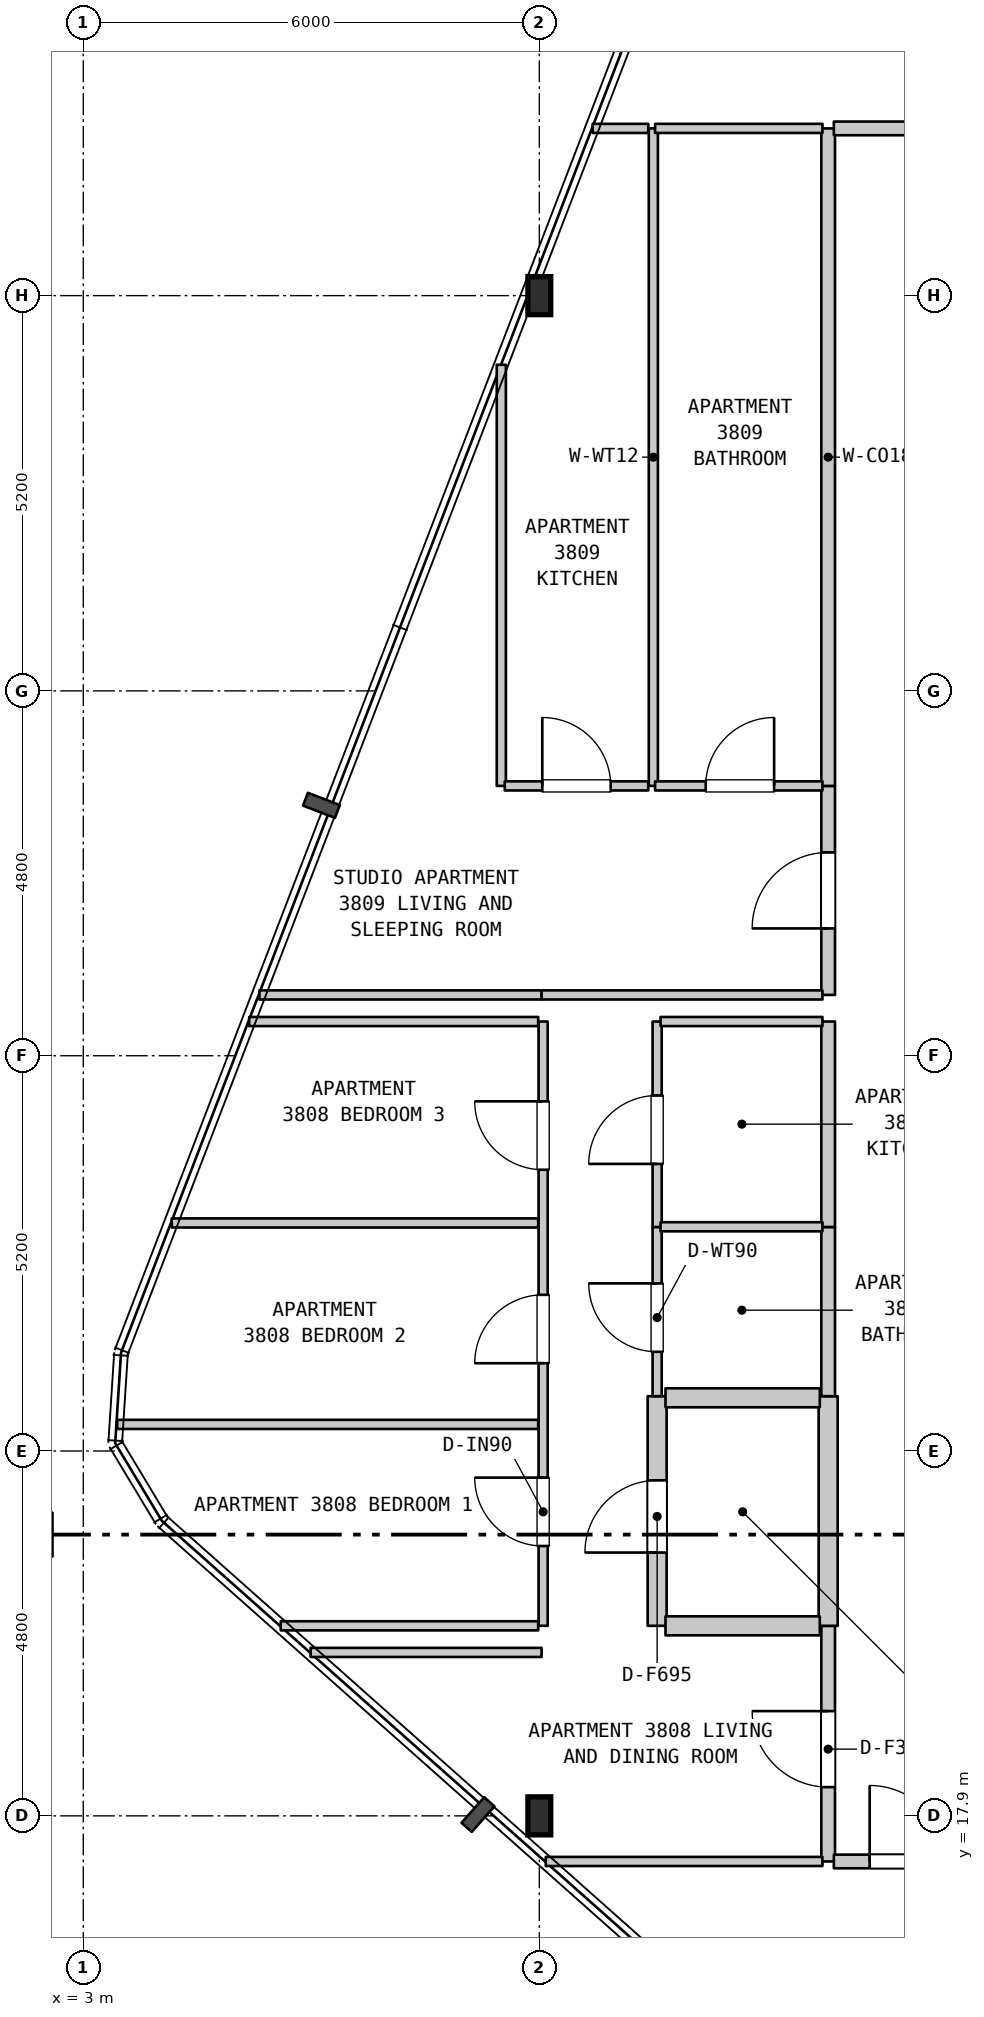
"""IFC4 building model, lengths in metres.
Left out: names, types, materials, properties, quantities, classifications, styles, units other than length and angle.
Written with IfcOpenShell. Run it as: python <this file> out.ifc"""

import sys

from ifc_helpers import new_model, si_unit, direction, frame, frame_2d, origin, origin_2d, place, context, subcontext, project, spatial, rectangle, i_section, extrude, element, fill, save


model = new_model("IFC4")
c1 = context("Model", 3, precision=1e-05, world=origin(), true_north=direction((0.0, 1.0)))
c2 = subcontext(c1, "Body", "Model", "MODEL_VIEW")
j1 = project(units=[si_unit("LENGTHUNIT", "METRE"), si_unit("PLANEANGLEUNIT", "RADIAN")], contexts=[c1])
p1 = place(None, origin())
s1 = spatial("IfcSite", under=j1, at=p1, CompositionType="ELEMENT")
p2 = place(p1, origin())
s2 = spatial("IfcBuilding", under=s1, at=p2, CompositionType="ELEMENT")
p3 = place(p2, frame((0.0, 0.0, 155.7)))
s3 = spatial("IfcBuildingStorey", under=s2, at=p3, CompositionType="ELEMENT", Elevation=155.7)
for number, where, z_axis, x_axis in (
    (1, (9.0, 17.9, 0.0), (0.0, 0.0, 1.0), (1.0, 0.0, 0.0)),
    (2, (9.0, 37.9, 0.0), (0.0, 0.0, 1.0), (1.0, 0.0, 0.0)),
):
    element("IfcColumn", number, at=place(p3, frame(where, z_axis=z_axis, x_axis=x_axis)), inside=s3, PredefinedType="COLUMN", context=c2, shape_type="SweptSolid", body=[
        extrude(i_section(OverallWidth=0.3, OverallDepth=0.5, WebThickness=0.014, FlangeThickness=0.028, FilletRadius=0.027, at=origin_2d()), origin(), (0.0, 0.0, 1.0), 3.7),
    ])
p4 = place(p3, frame((8.5, 31.45, 0.0), z_axis=(0.0, 0.0, 1.0), x_axis=(0.0, 1.0, 0.0)))
e3 = element("IfcWall", 3, at=p4, inside=s3, PredefinedType="PARTITIONING", context=c2, shape_type="SweptSolid", body=[
    extrude(rectangle(XDim=5.54, YDim=0.12, at=frame_2d((2.77, 0.0))), origin(), (0.0, 0.0, 1.0), 3.28),
])
p5 = place(p3, frame((9.05, 20.4, 0.0), z_axis=(0.0, 0.0, 1.0), x_axis=(0.0, 1.0, 0.0)))
e4 = element("IfcWall", 4, at=p5, inside=s3, PredefinedType="PARTITIONING", context=c2, shape_type="SweptSolid", body=[
    extrude(rectangle(XDim=7.95, YDim=0.12, at=frame_2d((3.975, 0.0))), origin(), (0.0, 0.0, 1.0), 2.68),
])
p6 = place(p5, frame((1.05, 0.0, 0.0)))
e5 = element("IfcOpeningElement", 5, at=p6, cuts=e4, PredefinedType="OPENING", context=c2, shape_type="SweptSolid", body=[
    extrude(rectangle(XDim=0.9, YDim=2.15, at=frame_2d((0.45, 1.075))), frame((0.0, 0.07, 0.0), z_axis=(0.0, -1.0, 0.0), x_axis=(1.0, 0.0, 0.0)), (0.0, 0.0, 1.0), 0.14),
])
p7 = place(p5, frame((3.455, 0.0, 0.0)))
e6 = element("IfcOpeningElement", 6, at=p7, cuts=e4, PredefinedType="OPENING", context=c2, shape_type="SweptSolid", body=[
    extrude(rectangle(XDim=0.9, YDim=2.15, at=frame_2d((0.45, 1.075))), frame((0.0, 0.07, 0.0), z_axis=(0.0, -1.0, 0.0), x_axis=(1.0, 0.0, 0.0)), (0.0, 0.0, 1.0), 0.14),
])
p8 = place(p5, frame((6.0, 0.0, 0.0)))
e7 = element("IfcOpeningElement", 7, at=p8, cuts=e4, PredefinedType="OPENING", context=c2, shape_type="SweptSolid", body=[
    extrude(rectangle(XDim=0.9, YDim=2.15, at=frame_2d((0.45, 1.075))), frame((0.0, 0.07, 0.0), z_axis=(0.0, -1.0, 0.0), x_axis=(1.0, 0.0, 0.0)), (0.0, 0.0, 1.0), 0.14),
])
p9 = place(p3, frame((10.5, 31.45, 0.0), z_axis=(0.0, 0.0, 1.0), x_axis=(0.0, 1.0, 0.0)))
e8 = element("IfcWall", 8, at=p9, inside=s3, PredefinedType="PARTITIONING", context=c2, shape_type="SweptSolid", body=[
    extrude(rectangle(XDim=8.65, YDim=0.12, at=frame_2d((4.325, 0.0))), origin(), (0.0, 0.0, 1.0), 3.28),
])
p10 = place(p3, frame((10.55, 20.4, 0.0), z_axis=(0.0, 0.0, 1.0), x_axis=(0.0, 1.0, 0.0)))
e9 = element("IfcWall", 9, at=p10, inside=s3, PredefinedType="STANDARD", context=c2, shape_type="SweptSolid", body=[
    extrude(rectangle(XDim=3.021, YDim=0.25, at=frame_2d((1.51, 0.0))), origin(), (0.0, 0.0, 1.0), 3.28),
])
p11 = place(p10, frame((0.964, 0.0, 0.0)))
e10 = element("IfcOpeningElement", 10, at=p11, cuts=e9, PredefinedType="OPENING", context=c2, shape_type="SweptSolid", body=[
    extrude(rectangle(XDim=0.95, YDim=2.15, at=frame_2d((0.475, 1.075))), frame((0.0, 0.135, 0.0), z_axis=(0.0, -1.0, 0.0), x_axis=(1.0, 0.0, 0.0)), (0.0, 0.0, 1.0), 0.27),
])
p12 = place(p3, frame((10.55, 23.421, 0.0), z_axis=(0.0, 0.0, 1.0), x_axis=(0.0, 1.0, 0.0)))
e11 = element("IfcWall", 11, at=p12, inside=s3, PredefinedType="PARTITIONING", context=c2, shape_type="SweptSolid", body=[
    extrude(rectangle(XDim=2.226, YDim=0.12, at=frame_2d((1.113, 0.0))), origin(), (0.0, 0.0, 1.0), 3.28),
])
p13 = place(p12, frame((0.584, 0.0, 0.0)))
e12 = element("IfcOpeningElement", 12, at=p13, cuts=e11, PredefinedType="OPENING", context=c2, shape_type="SweptSolid", body=[
    extrude(rectangle(XDim=0.9, YDim=2.1, at=frame_2d((0.45, 1.05))), frame((0.0, 0.07, 0.0), z_axis=(0.0, -1.0, 0.0), x_axis=(1.0, 0.0, 0.0)), (0.0, 0.0, 1.0), 0.14),
])
p14 = place(p3, frame((10.55, 25.647, 0.0), z_axis=(0.0, 0.0, 1.0), x_axis=(0.0, 1.0, 0.0)))
e13 = element("IfcWall", 13, at=p14, inside=s3, PredefinedType="PARTITIONING", context=c2, shape_type="SweptSolid", body=[
    extrude(rectangle(XDim=2.703, YDim=0.12, at=frame_2d((1.352, 0.0))), origin(), (0.0, 0.0, 1.0), 3.28),
])
p15 = place(p14, frame((0.83, 0.0, 0.0)))
e14 = element("IfcOpeningElement", 14, at=p15, cuts=e13, PredefinedType="OPENING", context=c2, shape_type="SweptSolid", body=[
    extrude(rectangle(XDim=0.9, YDim=2.15, at=frame_2d((0.45, 1.075))), frame((0.0, 0.07, 0.0), z_axis=(0.0, -1.0, 0.0), x_axis=(1.0, 0.0, 0.0)), (0.0, 0.0, 1.0), 0.14),
])
p16 = place(p3, frame((12.8, 17.3, 0.0), z_axis=(0.0, 0.0, 1.0), x_axis=(0.0, 1.0, 0.0)))
e15 = element("IfcWall", 15, at=p16, inside=s3, PredefinedType="STANDARD", context=c2, shape_type="SweptSolid", body=[
    extrude(rectangle(XDim=3.1, YDim=0.18, at=frame_2d((1.55, 0.0))), origin(), (0.0, 0.0, 1.0), 3.28),
])
p17 = place(p16, frame((0.978, 0.0, 0.0)))
e16 = element("IfcOpeningElement", 16, at=p17, cuts=e15, PredefinedType="OPENING", context=c2, shape_type="SweptSolid", body=[
    extrude(rectangle(XDim=1.0, YDim=2.15, at=frame_2d((0.5, 1.075))), frame((0.0, 0.1, 0.0), z_axis=(0.0, -1.0, 0.0), x_axis=(1.0, 0.0, 0.0)), (0.0, 0.0, 1.0), 0.2),
])
p18 = place(p3, frame((12.8, 20.4, 0.0), z_axis=(0.0, 0.0, 1.0), x_axis=(0.0, 1.0, 0.0)))
e17 = element("IfcWall", 17, at=p18, inside=s3, PredefinedType="STANDARD", context=c2, shape_type="SweptSolid", body=[
    extrude(rectangle(XDim=3.021, YDim=0.25, at=frame_2d((1.51, 0.0))), origin(), (0.0, 0.0, 1.0), 3.28),
])
p19 = place(p3, frame((12.8, 23.421, 0.0), z_axis=(0.0, 0.0, 1.0), x_axis=(0.0, 1.0, 0.0)))
e18 = element("IfcWall", 18, at=p19, inside=s3, PredefinedType="STANDARD", context=c2, shape_type="SweptSolid", body=[
    extrude(rectangle(XDim=2.226, YDim=0.18, at=frame_2d((1.113, 0.0))), origin(), (0.0, 0.0, 1.0), 3.28),
])
p20 = place(p3, frame((12.8, 25.647, 0.0), z_axis=(0.0, 0.0, 1.0), x_axis=(0.0, 1.0, 0.0)))
e19 = element("IfcWall", 19, at=p20, inside=s3, PredefinedType="STANDARD", context=c2, shape_type="SweptSolid", body=[
    extrude(rectangle(XDim=2.703, YDim=0.18, at=frame_2d((1.352, 0.0))), origin(), (0.0, 0.0, 1.0), 3.28),
])
p21 = place(p3, frame((12.8, 28.7, 0.0), z_axis=(0.0, 0.0, 1.0), x_axis=(0.0, 1.0, 0.0)))
e20 = element("IfcWall", 20, at=p21, inside=s3, PredefinedType="STANDARD", context=c2, shape_type="SweptSolid", body=[
    extrude(rectangle(XDim=2.75, YDim=0.18, at=frame_2d((1.375, 0.0))), origin(), (0.0, 0.0, 1.0), 3.28),
])
p22 = place(p21, frame((0.875, 0.0, 0.0)))
e21 = element("IfcOpeningElement", 21, at=p22, cuts=e20, PredefinedType="OPENING", context=c2, shape_type="SweptSolid", body=[
    extrude(rectangle(XDim=1.0, YDim=2.15, at=frame_2d((0.5, 1.075))), frame((0.0, 0.1, 0.0), z_axis=(0.0, -1.0, 0.0), x_axis=(1.0, 0.0, 0.0)), (0.0, 0.0, 1.0), 0.2),
])
p23 = place(p3, frame((12.8, 31.45, 0.0), z_axis=(0.0, 0.0, 1.0), x_axis=(0.0, 1.0, 0.0)))
e22 = element("IfcWall", 22, at=p23, inside=s3, PredefinedType="STANDARD", context=c2, shape_type="SweptSolid", body=[
    extrude(rectangle(XDim=8.65, YDim=0.18, at=frame_2d((4.325, 0.0))), origin(), (0.0, 0.0, 1.0), 3.28),
])
p24 = place(p3, frame((9.085, 17.3, 0.0), z_axis=(0.0, 0.0, 1.0), x_axis=(1.0, 0.0, 0.0)))
e23 = element("IfcWall", 23, at=p24, inside=s3, PredefinedType="PARTITIONING", context=c2, shape_type="SweptSolid", body=[
    extrude(rectangle(XDim=3.64, YDim=0.12, at=frame_2d((1.82, 0.0))), origin(), (0.0, 0.0, 1.0), 3.28),
])
p25 = place(p3, frame((12.875, 17.3, 0.0), z_axis=(0.0, 0.0, 1.0), x_axis=(1.0, 0.0, 0.0)))
e24 = element("IfcWall", 24, at=p25, inside=s3, PredefinedType="STANDARD", context=c2, shape_type="SweptSolid", body=[
    extrude(rectangle(XDim=3.28, YDim=0.18, at=frame_2d((1.64, 0.0))), origin(), (0.0, 0.0, 1.0), 3.28),
])
p26 = place(p25, frame((0.471, 0.0, 0.0)))
e25 = element("IfcOpeningElement", 25, at=p26, cuts=e24, PredefinedType="OPENING", context=c2, shape_type="SweptSolid", body=[
    extrude(rectangle(XDim=1.0, YDim=2.15, at=frame_2d((0.5, 1.075))), frame((0.0, 0.1, 0.0), z_axis=(0.0, -1.0, 0.0), x_axis=(1.0, 0.0, 0.0)), (0.0, 0.0, 1.0), 0.2),
])
p27 = place(p3, frame((5.991, 20.05, 0.0), z_axis=(0.0, 0.0, 1.0), x_axis=(1.0, 0.0, 0.0)))
e26 = element("IfcWall", 26, at=p27, inside=s3, PredefinedType="PARTITIONING", context=c2, shape_type="SweptSolid", body=[
    extrude(rectangle(XDim=3.039, YDim=0.12, at=frame_2d((1.52, 0.0))), origin(), (0.0, 0.0, 1.0), 3.28),
])
p28 = place(p3, frame((5.598, 20.4, 0.0), z_axis=(0.0, 0.0, 1.0), x_axis=(1.0, 0.0, 0.0)))
e27 = element("IfcWall", 27, at=p28, inside=s3, PredefinedType="PARTITIONING", context=c2, shape_type="SweptSolid", body=[
    extrude(rectangle(XDim=3.387, YDim=0.12, at=frame_2d((1.694, 0.0))), origin(), (0.0, 0.0, 1.0), 3.28),
])
p29 = place(p3, frame((10.66, 20.4, 0.0), z_axis=(0.0, 0.0, 1.0), x_axis=(1.0, 0.0, 0.0)))
e28 = element("IfcWall", 28, at=p29, inside=s3, PredefinedType="STANDARD", context=c2, shape_type="SweptSolid", body=[
    extrude(rectangle(XDim=2.03, YDim=0.25, at=frame_2d((1.015, 0.0))), origin(), (0.0, 0.0, 1.0), 3.28),
])
p30 = place(p3, frame((3.446, 23.05, 0.0), z_axis=(0.0, 0.0, 1.0), x_axis=(1.0, 0.0, 0.0)))
e29 = element("IfcWall", 29, at=p30, inside=s3, PredefinedType="PARTITIONING", context=c2, shape_type="SweptSolid", body=[
    extrude(rectangle(XDim=5.539, YDim=0.12, at=frame_2d((2.77, 0.0))), origin(), (0.0, 0.0, 1.0), 3.28),
])
p31 = place(p3, frame((10.66, 23.4, 0.0), z_axis=(0.0, 0.0, 1.0), x_axis=(1.0, 0.0, 0.0)))
e30 = element("IfcWall", 30, at=p31, inside=s3, PredefinedType="STANDARD", context=c2, shape_type="SweptSolid", body=[
    extrude(rectangle(XDim=2.03, YDim=0.25, at=frame_2d((1.015, 0.0))), origin(), (0.0, 0.0, 1.0), 3.28),
])
p32 = place(p3, frame((10.595, 25.65, 0.0), z_axis=(0.0, 0.0, 1.0), x_axis=(1.0, 0.0, 0.0)))
e31 = element("IfcWall", 31, at=p32, inside=s3, PredefinedType="PARTITIONING", context=c2, shape_type="SweptSolid", body=[
    extrude(rectangle(XDim=2.13, YDim=0.12, at=frame_2d((1.065, 0.0))), origin(), (0.0, 0.0, 1.0), 3.28),
])
p33 = place(p3, frame((4.164, 25.7, 0.0), z_axis=(0.0, 0.0, 1.0), x_axis=(1.0, 0.0, 0.0)))
e32 = element("IfcWall", 32, at=p33, inside=s3, PredefinedType="PARTITIONING", context=c2, shape_type="SweptSolid", body=[
    extrude(rectangle(XDim=4.821, YDim=0.12, at=frame_2d((2.411, 0.0))), origin(), (0.0, 0.0, 1.0), 3.28),
])
p34 = place(p3, frame((5.183, 28.35, 0.0), z_axis=(0.0, 0.0, 1.0), x_axis=(1.0, 0.0, 0.0)))
e33 = element("IfcWall", 33, at=p34, inside=s3, PredefinedType="PARTITIONING", context=c2, shape_type="SweptSolid", body=[
    extrude(rectangle(XDim=3.802, YDim=0.12, at=frame_2d((1.901, 0.0))), origin(), (0.0, 0.0, 1.0), 3.28),
])
p35 = place(p3, frame((10.595, 28.35, 0.0), z_axis=(0.0, 0.0, 1.0), x_axis=(1.0, 0.0, 0.0)))
e34 = element("IfcWall", 34, at=p35, inside=s3, PredefinedType="PARTITIONING", context=c2, shape_type="SweptSolid", body=[
    extrude(rectangle(XDim=2.13, YDim=0.12, at=frame_2d((1.065, 0.0))), origin(), (0.0, 0.0, 1.0), 3.28),
])
p36 = place(p3, frame((5.317, 28.7, 0.0), z_axis=(0.0, 0.0, 1.0), x_axis=(1.0, 0.0, 0.0)))
e35 = element("IfcWall", 35, at=p36, inside=s3, PredefinedType="PARTITIONING", context=c2, shape_type="SweptSolid", body=[
    extrude(rectangle(XDim=3.713, YDim=0.12, at=frame_2d((1.856, 0.0))), origin(), (0.0, 0.0, 1.0), 3.28),
])
p37 = place(p3, frame((9.03, 28.7, 0.0), z_axis=(0.0, 0.0, 1.0), x_axis=(1.0, 0.0, 0.0)))
e36 = element("IfcWall", 36, at=p37, inside=s3, PredefinedType="PARTITIONING", context=c2, shape_type="SweptSolid", body=[
    extrude(rectangle(XDim=3.695, YDim=0.12, at=frame_2d((1.848, 0.0))), origin(), (0.0, 0.0, 1.0), 3.28),
])
p38 = place(p3, frame((8.545, 31.45, 0.0), z_axis=(0.0, 0.0, 1.0), x_axis=(1.0, 0.0, 0.0)))
e37 = element("IfcWall", 37, at=p38, inside=s3, PredefinedType="PARTITIONING", context=c2, shape_type="SweptSolid", body=[
    extrude(rectangle(XDim=1.888, YDim=0.12, at=frame_2d((0.944, 0.0))), origin(), (0.0, 0.0, 1.0), 3.28),
])
p39 = place(p38, frame((0.494, 0.0, 0.0)))
e38 = element("IfcOpeningElement", 38, at=p39, cuts=e37, PredefinedType="OPENING", context=c2, shape_type="SweptSolid", body=[
    extrude(rectangle(XDim=0.9, YDim=2.15, at=frame_2d((0.45, 1.075))), frame((0.0, 0.07, 0.0), z_axis=(0.0, -1.0, 0.0), x_axis=(1.0, 0.0, 0.0)), (0.0, 0.0, 1.0), 0.14),
])
p40 = place(p3, frame((10.523, 31.45, 0.0), z_axis=(0.0, 0.0, 1.0), x_axis=(1.0, 0.0, 0.0)))
e39 = element("IfcWall", 39, at=p40, inside=s3, PredefinedType="PARTITIONING", context=c2, shape_type="SweptSolid", body=[
    extrude(rectangle(XDim=2.202, YDim=0.12, at=frame_2d((1.101, 0.0))), origin(), (0.0, 0.0, 1.0), 3.28),
])
p41 = place(p40, frame((0.666, 0.0, 0.0)))
e40 = element("IfcOpeningElement", 40, at=p41, cuts=e39, PredefinedType="OPENING", context=c2, shape_type="SweptSolid", body=[
    extrude(rectangle(XDim=0.9, YDim=2.1, at=frame_2d((0.45, 1.05))), frame((0.0, 0.07, 0.0), z_axis=(0.0, -1.0, 0.0), x_axis=(1.0, 0.0, 0.0)), (0.0, 0.0, 1.0), 0.14),
])
p42 = place(p3, frame((9.702, 40.1, 0.0), z_axis=(0.0, 0.0, 1.0), x_axis=(1.0, 0.0, 0.0)))
e41 = element("IfcWall", 41, at=p42, inside=s3, PredefinedType="PARTITIONING", context=c2, shape_type="SweptSolid", body=[
    extrude(rectangle(XDim=0.731, YDim=0.12, at=frame_2d((0.366, 0.0))), origin(), (0.0, 0.0, 1.0), 3.28),
])
p43 = place(p3, frame((10.523, 40.1, 0.0), z_axis=(0.0, 0.0, 1.0), x_axis=(1.0, 0.0, 0.0)))
e42 = element("IfcWall", 42, at=p43, inside=s3, PredefinedType="PARTITIONING", context=c2, shape_type="SweptSolid", body=[
    extrude(rectangle(XDim=2.202, YDim=0.12, at=frame_2d((1.101, 0.0))), origin(), (0.0, 0.0, 1.0), 3.28),
])
p44 = place(p3, frame((12.875, 40.1, 0.0), z_axis=(0.0, 0.0, 1.0), x_axis=(1.0, 0.0, 0.0)))
e43 = element("IfcWall", 43, at=p44, inside=s3, PredefinedType="STANDARD", context=c2, shape_type="SweptSolid", body=[
    extrude(rectangle(XDim=5.8, YDim=0.18, at=frame_2d((2.9, 0.0))), origin(), (0.0, 0.0, 1.0), 3.28),
])
p45 = place(p44, frame((2.314, 0.0, 0.0)))
e44 = element("IfcOpeningElement", 44, at=p45, cuts=e43, PredefinedType="OPENING", context=c2, shape_type="SweptSolid", body=[
    extrude(rectangle(XDim=1.0, YDim=2.15, at=frame_2d((0.5, 1.075))), frame((0.0, 0.1, 0.0), z_axis=(0.0, -1.0, 0.0), x_axis=(1.0, 0.0, 0.0)), (0.0, 0.0, 1.0), 0.2),
])
p46 = place(p6, origin())
e45 = element("IfcDoor", 45, at=p46, inside=s3, OperationType="SINGLE_SWING_RIGHT", PredefinedType="DOOR", context=c2, shape_type="SweptSolid", body=[
    extrude(rectangle(XDim=0.9, YDim=2.15, at=frame_2d((0.45, 1.075))), frame((0.0, 0.025, 0.0), z_axis=(0.0, -1.0, 0.0), x_axis=(1.0, 0.0, 0.0)), (0.0, 0.0, 1.0), 0.05),
])
fill(e5, e45)
p47 = place(p7, origin())
e46 = element("IfcDoor", 46, at=p47, inside=s3, OperationType="SINGLE_SWING_LEFT", PredefinedType="DOOR", context=c2, shape_type="SweptSolid", body=[
    extrude(rectangle(XDim=0.9, YDim=2.15, at=frame_2d((0.45, 1.075))), frame((0.0, 0.025, 0.0), z_axis=(0.0, -1.0, 0.0), x_axis=(1.0, 0.0, 0.0)), (0.0, 0.0, 1.0), 0.05),
])
fill(e6, e46)
p48 = place(p8, origin())
e47 = element("IfcDoor", 47, at=p48, inside=s3, OperationType="SINGLE_SWING_RIGHT", PredefinedType="DOOR", context=c2, shape_type="SweptSolid", body=[
    extrude(rectangle(XDim=0.9, YDim=2.15, at=frame_2d((0.45, 1.075))), frame((0.0, 0.025, 0.0), z_axis=(0.0, -1.0, 0.0), x_axis=(1.0, 0.0, 0.0)), (0.0, 0.0, 1.0), 0.05),
])
fill(e7, e47)
p49 = place(p11, origin())
e48 = element("IfcDoor", 48, at=p49, inside=s3, OperationType="SINGLE_SWING_LEFT", PredefinedType="DOOR", context=c2, shape_type="SweptSolid", body=[
    extrude(rectangle(XDim=0.95, YDim=2.15, at=frame_2d((0.475, 1.075))), frame((0.0, 0.025, 0.0), z_axis=(0.0, -1.0, 0.0), x_axis=(1.0, 0.0, 0.0)), (0.0, 0.0, 1.0), 0.05),
])
fill(e10, e48)
p50 = place(p13, origin())
e49 = element("IfcDoor", 49, at=p50, inside=s3, OperationType="SINGLE_SWING_RIGHT", PredefinedType="DOOR", context=c2, shape_type="SweptSolid", body=[
    extrude(rectangle(XDim=0.9, YDim=2.1, at=frame_2d((0.45, 1.05))), frame((0.0, 0.025, 0.0), z_axis=(0.0, -1.0, 0.0), x_axis=(1.0, 0.0, 0.0)), (0.0, 0.0, 1.0), 0.05),
])
fill(e12, e49)
p51 = place(p15, origin())
e50 = element("IfcDoor", 50, at=p51, inside=s3, OperationType="SINGLE_SWING_LEFT", PredefinedType="DOOR", context=c2, shape_type="SweptSolid", body=[
    extrude(rectangle(XDim=0.9, YDim=2.15, at=frame_2d((0.45, 1.075))), frame((0.0, 0.025, 0.0), z_axis=(0.0, -1.0, 0.0), x_axis=(1.0, 0.0, 0.0)), (0.0, 0.0, 1.0), 0.05),
])
fill(e14, e50)
p52 = place(p17, origin())
e51 = element("IfcDoor", 51, at=p52, inside=s3, OperationType="SINGLE_SWING_RIGHT", PredefinedType="DOOR", context=c2, shape_type="SweptSolid", body=[
    extrude(rectangle(XDim=1.0, YDim=2.15, at=frame_2d((0.5, 1.075))), frame((0.0, 0.025, 0.0), z_axis=(0.0, -1.0, 0.0), x_axis=(1.0, 0.0, 0.0)), (0.0, 0.0, 1.0), 0.05),
])
fill(e16, e51)
p53 = place(p22, origin())
e52 = element("IfcDoor", 52, at=p53, inside=s3, OperationType="SINGLE_SWING_LEFT", PredefinedType="DOOR", context=c2, shape_type="SweptSolid", body=[
    extrude(rectangle(XDim=1.0, YDim=2.15, at=frame_2d((0.5, 1.075))), frame((0.0, 0.025, 0.0), z_axis=(0.0, -1.0, 0.0), x_axis=(1.0, 0.0, 0.0)), (0.0, 0.0, 1.0), 0.05),
])
fill(e21, e52)
p54 = place(p26, origin())
e53 = element("IfcDoor", 53, at=p54, inside=s3, OperationType="SINGLE_SWING_LEFT", PredefinedType="DOOR", context=c2, shape_type="SweptSolid", body=[
    extrude(rectangle(XDim=1.0, YDim=2.15, at=frame_2d((0.5, 1.075))), frame((0.0, 0.025, 0.0), z_axis=(0.0, -1.0, 0.0), x_axis=(1.0, 0.0, 0.0)), (0.0, 0.0, 1.0), 0.05),
])
fill(e25, e53)
p55 = place(p39, origin())
e54 = element("IfcDoor", 54, at=p55, inside=s3, OperationType="SINGLE_SWING_LEFT", PredefinedType="DOOR", context=c2, shape_type="SweptSolid", body=[
    extrude(rectangle(XDim=0.9, YDim=2.15, at=frame_2d((0.45, 1.075))), frame((0.0, 0.025, 0.0), z_axis=(0.0, -1.0, 0.0), x_axis=(1.0, 0.0, 0.0)), (0.0, 0.0, 1.0), 0.05),
])
fill(e38, e54)
p56 = place(p41, origin())
e55 = element("IfcDoor", 55, at=p56, inside=s3, OperationType="SINGLE_SWING_RIGHT", PredefinedType="DOOR", context=c2, shape_type="SweptSolid", body=[
    extrude(rectangle(XDim=0.9, YDim=2.1, at=frame_2d((0.45, 1.05))), frame((0.0, 0.025, 0.0), z_axis=(0.0, -1.0, 0.0), x_axis=(1.0, 0.0, 0.0)), (0.0, 0.0, 1.0), 0.05),
])
fill(e40, e55)
save(model, sys.argv[1])
